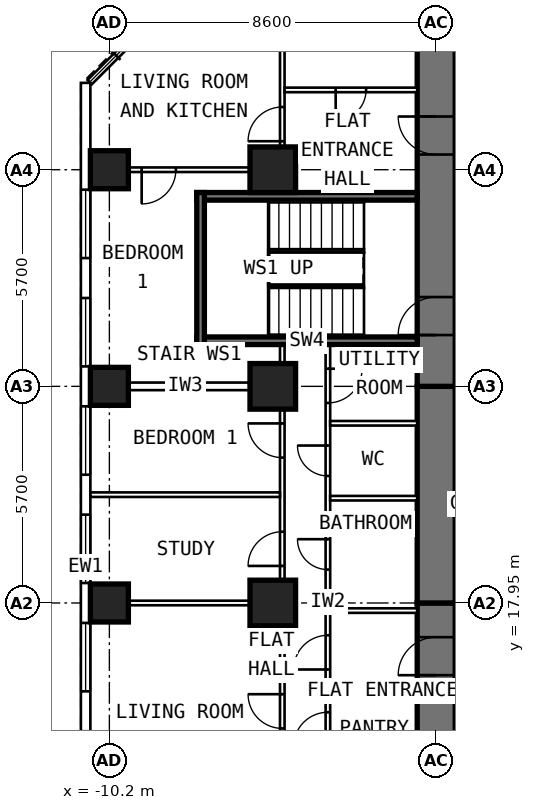
"""IFC4 building model, lengths in metres.
Left out: names, types, materials, properties, quantities, classifications, styles, units other than length and angle.
Written with IfcOpenShell. Run it as: python <this file> out.ifc"""

import sys

from ifc_helpers import new_model, si_unit, direction, frame, frame_2d, origin, origin_2d, place, context, subcontext, project, spatial, rectangle, extrude, element, fill, save


model = new_model("IFC4")
c1 = context("Model", 3, precision=1e-05, world=origin(), true_north=direction((0.0, 1.0)))
c2 = subcontext(c1, "Body", "Model", "MODEL_VIEW")
j1 = project(units=[si_unit("LENGTHUNIT", "METRE"), si_unit("PLANEANGLEUNIT", "RADIAN")], contexts=[c1])
p1 = place(None, origin())
s1 = spatial("IfcSite", under=j1, at=p1, CompositionType="ELEMENT")
p2 = place(p1, origin())
s2 = spatial("IfcBuilding", under=s1, at=p2, CompositionType="ELEMENT")
p3 = place(p2, frame((0.0, 0.0, 64.6)))
s3 = spatial("IfcBuildingStorey", under=s2, at=p3, CompositionType="ELEMENT", Elevation=64.6)
for number, where, z_axis, x_axis in (
    (1, (-10.2, 17.95, 0.0), (0.0, 0.0, 1.0), (0.0, 1.0, 0.0)),
    (2, (-10.2, 23.65, 0.0), (0.0, 0.0, 1.0), (0.0, 1.0, 0.0)),
    (3, (-10.2, 29.35, 0.0), (0.0, 0.0, 1.0), (0.0, 1.0, 0.0)),
):
    element("IfcColumn", number, at=place(p3, frame(where, z_axis=z_axis, x_axis=x_axis)), inside=s3, PredefinedType="COLUMN", context=c2, shape_type="SweptSolid", body=[
        extrude(rectangle(XDim=1.0, YDim=1.0, at=origin_2d()), origin(), (0.0, 0.0, 1.0), 3.6),
    ])
for number, where, z_axis, x_axis in (
    (4, (-5.9, 17.95, 0.0), (0.0, 0.0, 1.0), (0.0, 1.0, 0.0)),
    (5, (-5.9, 23.65, 0.0), (0.0, 0.0, 1.0), (0.0, 1.0, 0.0)),
    (6, (-5.9, 29.35, 0.0), (0.0, 0.0, 1.0), (0.0, 1.0, 0.0)),
):
    element("IfcColumn", number, at=place(p3, frame(where, z_axis=z_axis, x_axis=x_axis)), inside=s3, PredefinedType="COLUMN", context=c2, shape_type="SweptSolid", body=[
        extrude(rectangle(XDim=1.2, YDim=1.2, at=origin_2d()), origin(), (0.0, 0.0, 1.0), 3.6),
    ])
p4 = place(p3, frame((-1.6, 9.6, 0.0), z_axis=(0.0, 0.0, 1.0), x_axis=(0.0, 1.0, 0.0)))
e7 = element("IfcWall", 7, at=p4, inside=s3, PredefinedType="SHEAR", context=c2, shape_type="SweptSolid", body=[
    extrude(rectangle(XDim=8.35, YDim=1.0, at=frame_2d((4.175, 0.0))), origin(), (0.0, 0.0, 1.0), 3.6),
])
p5 = place(p4, frame((6.45, 0.0, 0.0)))
e8 = element("IfcOpeningElement", 8, at=p5, cuts=e7, PredefinedType="OPENING", context=c2, shape_type="SweptSolid", body=[
    extrude(rectangle(XDim=1.0, YDim=2.1, at=frame_2d((0.5, 1.05))), frame((0.0, 0.512, 0.0), z_axis=(0.0, -1.0, 0.0), x_axis=(1.0, 0.0, 0.0)), (0.0, 0.0, 1.0), 1.024),
])
p6 = place(p3, frame((-1.6, 17.95, 0.0), z_axis=(0.0, 0.0, 1.0), x_axis=(0.0, 1.0, 0.0)))
e9 = element("IfcWall", 9, at=p6, inside=s3, PredefinedType="SHEAR", context=c2, shape_type="SweptSolid", body=[
    extrude(rectangle(XDim=5.7, YDim=1.0, at=frame_2d((2.85, 0.0))), origin(), (0.0, 0.0, 1.0), 3.6),
])
p7 = place(p3, frame((-1.6, 23.65, 0.0), z_axis=(0.0, 0.0, 1.0), x_axis=(0.0, 1.0, 0.0)))
e10 = element("IfcWall", 10, at=p7, inside=s3, PredefinedType="SHEAR", context=c2, shape_type="SweptSolid", body=[
    extrude(rectangle(XDim=10.745, YDim=1.0, at=frame_2d((5.373, 0.0))), origin(), (0.0, 0.0, 1.0), 3.6),
])
p8 = place(p7, frame((6.1, 0.0, 0.0)))
e11 = element("IfcOpeningElement", 11, at=p8, cuts=e10, PredefinedType="OPENING", context=c2, shape_type="SweptSolid", body=[
    extrude(rectangle(XDim=1.0, YDim=2.1, at=frame_2d((0.5, 1.05))), frame((0.0, 0.512, 0.0), z_axis=(0.0, -1.0, 0.0), x_axis=(1.0, 0.0, 0.0)), (0.0, 0.0, 1.0), 1.024),
])
p9 = place(p7, frame((1.35, 0.0, 0.0)))
e12 = element("IfcOpeningElement", 12, at=p9, cuts=e10, PredefinedType="OPENING", context=c2, shape_type="SweptSolid", body=[
    extrude(rectangle(XDim=1.0, YDim=2.1, at=frame_2d((0.5, 1.05))), frame((0.0, 0.512, 0.0), z_axis=(0.0, -1.0, 0.0), x_axis=(1.0, 0.0, 0.0)), (0.0, 0.0, 1.0), 1.024),
])
p10 = place(p3, frame((-10.825, 6.148, 0.0), z_axis=(0.0, 0.0, 1.0), x_axis=(0.0, 1.0, 0.0)))
e13 = element("IfcWall", 13, at=p10, inside=s3, PredefinedType="SOLIDWALL", context=c2, shape_type="SweptSolid", body=[
    extrude(rectangle(XDim=25.487, YDim=0.25, at=frame_2d((12.744, 0.0))), origin(), (0.0, 0.0, 1.0), 3.35),
])
p11 = place(p10, frame((0.927, 0.0, 0.8)))
e14 = element("IfcOpeningElement", 14, at=p11, cuts=e13, PredefinedType="OPENING", context=c2, shape_type="SweptSolid", body=[
    extrude(rectangle(XDim=1.8, YDim=1.8, at=frame_2d((0.9, 0.9))), frame((0.0, 0.137, 0.0), z_axis=(0.0, -1.0, 0.0), x_axis=(1.0, 0.0, 0.0)), (0.0, 0.0, 1.0), 0.274),
])
p12 = place(p10, frame((3.777, 0.0, 0.8)))
e15 = element("IfcOpeningElement", 15, at=p12, cuts=e13, PredefinedType="OPENING", context=c2, shape_type="SweptSolid", body=[
    extrude(rectangle(XDim=1.8, YDim=1.8, at=frame_2d((0.9, 0.9))), frame((0.0, 0.137, 0.0), z_axis=(0.0, -1.0, 0.0), x_axis=(1.0, 0.0, 0.0)), (0.0, 0.0, 1.0), 0.274),
])
p13 = place(p10, frame((6.627, 0.0, 0.8)))
e16 = element("IfcOpeningElement", 16, at=p13, cuts=e13, PredefinedType="OPENING", context=c2, shape_type="SweptSolid", body=[
    extrude(rectangle(XDim=1.8, YDim=1.8, at=frame_2d((0.9, 0.9))), frame((0.0, 0.137, 0.0), z_axis=(0.0, -1.0, 0.0), x_axis=(1.0, 0.0, 0.0)), (0.0, 0.0, 1.0), 0.274),
])
p14 = place(p10, frame((9.477, 0.0, 0.8)))
e17 = element("IfcOpeningElement", 17, at=p14, cuts=e13, PredefinedType="OPENING", context=c2, shape_type="SweptSolid", body=[
    extrude(rectangle(XDim=1.8, YDim=1.8, at=frame_2d((0.9, 0.9))), frame((0.0, 0.137, 0.0), z_axis=(0.0, -1.0, 0.0), x_axis=(1.0, 0.0, 0.0)), (0.0, 0.0, 1.0), 0.274),
])
p15 = place(p10, frame((12.327, 0.0, 0.8)))
e18 = element("IfcOpeningElement", 18, at=p15, cuts=e13, PredefinedType="OPENING", context=c2, shape_type="SweptSolid", body=[
    extrude(rectangle(XDim=1.8, YDim=1.8, at=frame_2d((0.9, 0.9))), frame((0.0, 0.137, 0.0), z_axis=(0.0, -1.0, 0.0), x_axis=(1.0, 0.0, 0.0)), (0.0, 0.0, 1.0), 0.274),
])
p16 = place(p10, frame((15.177, 0.0, 0.8)))
e19 = element("IfcOpeningElement", 19, at=p16, cuts=e13, PredefinedType="OPENING", context=c2, shape_type="SweptSolid", body=[
    extrude(rectangle(XDim=1.8, YDim=1.8, at=frame_2d((0.9, 0.9))), frame((0.0, 0.137, 0.0), z_axis=(0.0, -1.0, 0.0), x_axis=(1.0, 0.0, 0.0)), (0.0, 0.0, 1.0), 0.274),
])
p17 = place(p10, frame((18.027, 0.0, 0.8)))
e20 = element("IfcOpeningElement", 20, at=p17, cuts=e13, PredefinedType="OPENING", context=c2, shape_type="SweptSolid", body=[
    extrude(rectangle(XDim=1.8, YDim=1.8, at=frame_2d((0.9, 0.9))), frame((0.0, 0.137, 0.0), z_axis=(0.0, -1.0, 0.0), x_axis=(1.0, 0.0, 0.0)), (0.0, 0.0, 1.0), 0.274),
])
p18 = place(p10, frame((20.877, 0.0, 0.8)))
e21 = element("IfcOpeningElement", 21, at=p18, cuts=e13, PredefinedType="OPENING", context=c2, shape_type="SweptSolid", body=[
    extrude(rectangle(XDim=1.8, YDim=1.8, at=frame_2d((0.9, 0.9))), frame((0.0, 0.137, 0.0), z_axis=(0.0, -1.0, 0.0), x_axis=(1.0, 0.0, 0.0)), (0.0, 0.0, 1.0), 0.274),
])
p19 = place(p3, frame((-4.45, 10.1, 0.0), z_axis=(0.0, 0.0, 1.0), x_axis=(0.0, 1.0, 0.0)))
e22 = element("IfcWall", 22, at=p19, inside=s3, PredefinedType="PARTITIONING", context=c2, shape_type="SweptSolid", body=[
    extrude(rectangle(XDim=14.65, YDim=0.12, at=frame_2d((7.325, 0.0))), origin(), (0.0, 0.0, 1.0), 3.35),
])
p20 = place(p19, frame((0.375, 0.0, 0.0)))
e23 = element("IfcOpeningElement", 23, at=p20, cuts=e22, PredefinedType="OPENING", context=c2, shape_type="SweptSolid", body=[
    extrude(rectangle(XDim=0.9, YDim=2.1, at=frame_2d((0.45, 1.05))), frame((0.0, 0.072, 0.0), z_axis=(0.0, -1.0, 0.0), x_axis=(1.0, 0.0, 0.0)), (0.0, 0.0, 1.0), 0.144),
])
p21 = place(p19, frame((2.275, 0.0, 0.0)))
e24 = element("IfcOpeningElement", 24, at=p21, cuts=e22, PredefinedType="OPENING", context=c2, shape_type="SweptSolid", body=[
    extrude(rectangle(XDim=0.8, YDim=2.1, at=frame_2d((0.4, 1.05))), frame((0.0, 0.072, 0.0), z_axis=(0.0, -1.0, 0.0), x_axis=(1.0, 0.0, 0.0)), (0.0, 0.0, 1.0), 0.144),
])
p22 = place(p19, frame((4.075, 0.0, 0.0)))
e25 = element("IfcOpeningElement", 25, at=p22, cuts=e22, PredefinedType="OPENING", context=c2, shape_type="SweptSolid", body=[
    extrude(rectangle(XDim=0.9, YDim=2.1, at=frame_2d((0.45, 1.05))), frame((0.0, 0.072, 0.0), z_axis=(0.0, -1.0, 0.0), x_axis=(1.0, 0.0, 0.0)), (0.0, 0.0, 1.0), 0.144),
])
p23 = place(p19, frame((6.1, 0.0, 0.0)))
e26 = element("IfcOpeningElement", 26, at=p23, cuts=e22, PredefinedType="OPENING", context=c2, shape_type="SweptSolid", body=[
    extrude(rectangle(XDim=0.9, YDim=2.1, at=frame_2d((0.45, 1.05))), frame((0.0, 0.072, 0.0), z_axis=(0.0, -1.0, 0.0), x_axis=(1.0, 0.0, 0.0)), (0.0, 0.0, 1.0), 0.144),
])
p24 = place(p19, frame((8.729, 0.0, 0.0)))
e27 = element("IfcOpeningElement", 27, at=p24, cuts=e22, PredefinedType="OPENING", context=c2, shape_type="SweptSolid", body=[
    extrude(rectangle(XDim=0.8, YDim=2.1, at=frame_2d((0.4, 1.05))), frame((0.0, 0.072, 0.0), z_axis=(0.0, -1.0, 0.0), x_axis=(1.0, 0.0, 0.0)), (0.0, 0.0, 1.0), 0.144),
])
p25 = place(p19, frame((11.193, 0.0, 0.0)))
e28 = element("IfcOpeningElement", 28, at=p25, cuts=e22, PredefinedType="OPENING", context=c2, shape_type="SweptSolid", body=[
    extrude(rectangle(XDim=0.8, YDim=2.1, at=frame_2d((0.4, 1.05))), frame((0.0, 0.072, 0.0), z_axis=(0.0, -1.0, 0.0), x_axis=(1.0, 0.0, 0.0)), (0.0, 0.0, 1.0), 0.144),
])
p26 = place(p19, frame((13.114, 0.0, 0.0)))
e29 = element("IfcOpeningElement", 29, at=p26, cuts=e22, PredefinedType="OPENING", context=c2, shape_type="SweptSolid", body=[
    extrude(rectangle(XDim=0.9, YDim=2.1, at=frame_2d((0.45, 1.05))), frame((0.0, 0.072, 0.0), z_axis=(0.0, -1.0, 0.0), x_axis=(1.0, 0.0, 0.0)), (0.0, 0.0, 1.0), 0.144),
])
p27 = place(p3, frame((-5.65, 9.6, 0.0), z_axis=(0.0, 0.0, 1.0), x_axis=(0.0, 1.0, 0.0)))
e30 = element("IfcWall", 30, at=p27, inside=s3, PredefinedType="PARTITIONING", context=c2, shape_type="SweptSolid", body=[
    extrude(rectangle(XDim=15.15, YDim=0.12, at=frame_2d((7.575, 0.0))), origin(), (0.0, 0.0, 1.0), 3.35),
])
p28 = place(p27, frame((5.05, 0.0, 0.0)))
e31 = element("IfcOpeningElement", 31, at=p28, cuts=e30, PredefinedType="OPENING", context=c2, shape_type="SweptSolid", body=[
    extrude(rectangle(XDim=0.9, YDim=2.1, at=frame_2d((0.45, 1.05))), frame((0.0, 0.072, 0.0), z_axis=(0.0, -1.0, 0.0), x_axis=(1.0, 0.0, 0.0)), (0.0, 0.0, 1.0), 0.144),
])
p29 = place(p27, frame((9.325, 0.0, 0.0)))
e32 = element("IfcOpeningElement", 32, at=p29, cuts=e30, PredefinedType="OPENING", context=c2, shape_type="SweptSolid", body=[
    extrude(rectangle(XDim=0.9, YDim=2.1, at=frame_2d((0.45, 1.05))), frame((0.0, 0.072, 0.0), z_axis=(0.0, -1.0, 0.0), x_axis=(1.0, 0.0, 0.0)), (0.0, 0.0, 1.0), 0.144),
])
p30 = place(p27, frame((12.175, 0.0, 0.0)))
e33 = element("IfcOpeningElement", 33, at=p30, cuts=e30, PredefinedType="OPENING", context=c2, shape_type="SweptSolid", body=[
    extrude(rectangle(XDim=0.9, YDim=2.1, at=frame_2d((0.45, 1.05))), frame((0.0, 0.072, 0.0), z_axis=(0.0, -1.0, 0.0), x_axis=(1.0, 0.0, 0.0)), (0.0, 0.0, 1.0), 0.144),
])
p31 = place(p3, frame((-5.71, 17.95, 0.0), z_axis=(0.0, 0.0, 1.0), x_axis=(-1.0, 0.0, 0.0)))
e34 = element("IfcWall", 34, at=p31, inside=s3, PredefinedType="PARTITIONING", context=c2, shape_type="SweptSolid", body=[
    extrude(rectangle(XDim=4.99, YDim=0.12, at=frame_2d((2.495, 0.0))), origin(), (0.0, 0.0, 1.0), 2.45),
])
p32 = place(p3, frame((-5.71, 20.8, 0.0), z_axis=(0.0, 0.0, 1.0), x_axis=(-1.0, 0.0, 0.0)))
e35 = element("IfcWall", 35, at=p32, inside=s3, PredefinedType="PARTITIONING", context=c2, shape_type="SweptSolid", body=[
    extrude(rectangle(XDim=4.99, YDim=0.12, at=frame_2d((2.495, 0.0))), origin(), (0.0, 0.0, 1.0), 3.35),
])
p33 = place(p3, frame((-2.1, 15.55, 0.0), z_axis=(0.0, 0.0, 1.0), x_axis=(-1.0, 0.0, 0.0)))
e36 = element("IfcWall", 36, at=p33, inside=s3, PredefinedType="PARTITIONING", context=c2, shape_type="SweptSolid", body=[
    extrude(rectangle(XDim=2.29, YDim=0.12, at=frame_2d((1.145, 0.0))), origin(), (0.0, 0.0, 1.0), 3.35),
])
p34 = place(p3, frame((-2.1, 17.75, 0.0), z_axis=(0.0, 0.0, 1.0), x_axis=(-1.0, 0.0, 0.0)))
e37 = element("IfcWall", 37, at=p34, inside=s3, PredefinedType="PARTITIONING", context=c2, shape_type="SweptSolid", body=[
    extrude(rectangle(XDim=2.29, YDim=0.12, at=frame_2d((1.145, 0.0))), origin(), (0.0, 0.0, 1.0), 2.45),
])
for number, where, z_axis, x_axis in (
    (38, (-2.1, 20.707, 0.0), (0.0, 0.0, 1.0), (-1.0, 0.0, 0.0)),
    (39, (-2.1, 22.678, 0.0), (0.0, 0.0, 1.0), (-1.0, 0.0, 0.0)),
):
    element("IfcWall", number, at=place(p3, frame(where, z_axis=z_axis, x_axis=x_axis)), inside=s3, PredefinedType="PARTITIONING", context=c2, shape_type="SweptSolid", body=[
        extrude(rectangle(XDim=2.29, YDim=0.12, at=frame_2d((1.145, 0.0))), origin(), (0.0, 0.0, 1.0), 3.35),
    ])
p35 = place(p3, frame((-5.71, 23.65, 0.0), z_axis=(0.0, 0.0, 1.0), x_axis=(-1.0, 0.0, 0.0)))
e40 = element("IfcWall", 40, at=p35, inside=s3, PredefinedType="PARTITIONING", context=c2, shape_type="SweptSolid", body=[
    extrude(rectangle(XDim=4.99, YDim=0.2, at=frame_2d((2.495, 0.0))), origin(), (0.0, 0.0, 1.0), 2.45),
])
p36 = place(p3, frame((-5.71, 29.35, 0.0), z_axis=(0.0, 0.0, 1.0), x_axis=(-1.0, 0.0, 0.0)))
e41 = element("IfcWall", 41, at=p36, inside=s3, PredefinedType="PARTITIONING", context=c2, shape_type="SweptSolid", body=[
    extrude(rectangle(XDim=4.99, YDim=0.12, at=frame_2d((2.495, 0.0))), origin(), (0.0, 0.0, 1.0), 2.45),
])
p37 = place(p36, frame((2.74, 0.0, 0.0)))
e42 = element("IfcOpeningElement", 42, at=p37, cuts=e41, PredefinedType="OPENING", context=c2, shape_type="SweptSolid", body=[
    extrude(rectangle(XDim=0.9, YDim=2.1, at=frame_2d((0.45, 1.05))), frame((0.0, 0.072, 0.0), z_axis=(0.0, -1.0, 0.0), x_axis=(1.0, 0.0, 0.0)), (0.0, 0.0, 1.0), 0.144),
])
p38 = place(p3, frame((-5.65, 28.95, 0.0), z_axis=(0.0, 0.0, 1.0), x_axis=(0.0, 1.0, 0.0)))
e43 = element("IfcWall", 43, at=p38, inside=s3, PredefinedType="PARTITIONING", context=c2, shape_type="SweptSolid", body=[
    extrude(rectangle(XDim=5.445, YDim=0.12, at=frame_2d((2.723, 0.0))), origin(), (0.0, 0.0, 1.0), 3.35),
])
p39 = place(p38, frame((1.15, 0.0, 0.0)))
e44 = element("IfcOpeningElement", 44, at=p39, cuts=e43, PredefinedType="OPENING", context=c2, shape_type="SweptSolid", body=[
    extrude(rectangle(XDim=0.9, YDim=2.1, at=frame_2d((0.45, 1.05))), frame((0.0, 0.072, 0.0), z_axis=(0.0, -1.0, 0.0), x_axis=(1.0, 0.0, 0.0)), (0.0, 0.0, 1.0), 0.144),
])
p40 = place(p3, frame((-2.1, 31.45, 0.0), z_axis=(0.0, 0.0, 1.0), x_axis=(-1.0, 0.0, 0.0)))
e45 = element("IfcWall", 45, at=p40, inside=s3, PredefinedType="PARTITIONING", context=c2, shape_type="SweptSolid", body=[
    extrude(rectangle(XDim=3.49, YDim=0.12, at=frame_2d((1.745, 0.0))), origin(), (0.0, 0.0, 1.0), 3.35),
])
p41 = place(p40, frame((1.345, 0.0, 0.0)))
e46 = element("IfcOpeningElement", 46, at=p41, cuts=e45, PredefinedType="OPENING", context=c2, shape_type="SweptSolid", body=[
    extrude(rectangle(XDim=0.8, YDim=2.1, at=frame_2d((0.4, 1.05))), frame((0.0, 0.072, 0.0), z_axis=(0.0, -1.0, 0.0), x_axis=(1.0, 0.0, 0.0)), (0.0, 0.0, 1.0), 0.144),
])
for number, where, z_axis, x_axis in (
    (47, (-2.1, 24.85, 0.0), (0.0, 0.0, 1.0), (-1.0, 0.0, 0.0)),
    (48, (-2.1, 28.65, 0.0), (0.0, 0.0, 1.0), (-1.0, 0.0, 0.0)),
):
    element("IfcWall", number, at=place(p3, frame(where, z_axis=z_axis, x_axis=x_axis)), inside=s3, PredefinedType="SHEAR", context=c2, shape_type="SweptSolid", body=[
        extrude(rectangle(XDim=5.8, YDim=0.2, at=frame_2d((2.9, 0.0))), origin(), (0.0, 0.0, 1.0), 3.33),
    ])
p42 = place(p3, frame((-7.8, 24.75, 0.0), z_axis=(0.0, 0.0, 1.0), x_axis=(0.0, 1.0, 0.0)))
e49 = element("IfcWall", 49, at=p42, inside=s3, PredefinedType="SHEAR", context=c2, shape_type="SweptSolid", body=[
    extrude(rectangle(XDim=4.0, YDim=0.2, at=frame_2d((2.0, 0.0))), origin(), (0.0, 0.0, 1.0), 3.33),
])
p43 = place(p14, origin())
e50 = element("IfcWindow", 50, at=p43, inside=s3, PartitioningType="SINGLE_PANEL", PredefinedType="WINDOW", context=c2, shape_type="SweptSolid", body=[
    extrude(rectangle(XDim=1.8, YDim=1.8, at=frame_2d((0.9, 0.9))), frame((0.0, 0.03, 0.0), z_axis=(0.0, -1.0, 0.0), x_axis=(1.0, 0.0, 0.0)), (0.0, 0.0, 1.0), 0.06),
])
fill(e17, e50)
p44 = place(p15, origin())
e51 = element("IfcWindow", 51, at=p44, inside=s3, PartitioningType="SINGLE_PANEL", PredefinedType="WINDOW", context=c2, shape_type="SweptSolid", body=[
    extrude(rectangle(XDim=1.8, YDim=1.8, at=frame_2d((0.9, 0.9))), frame((0.0, 0.03, 0.0), z_axis=(0.0, -1.0, 0.0), x_axis=(1.0, 0.0, 0.0)), (0.0, 0.0, 1.0), 0.06),
])
fill(e18, e51)
p45 = place(p16, origin())
e52 = element("IfcWindow", 52, at=p45, inside=s3, PartitioningType="SINGLE_PANEL", PredefinedType="WINDOW", context=c2, shape_type="SweptSolid", body=[
    extrude(rectangle(XDim=1.8, YDim=1.8, at=frame_2d((0.9, 0.9))), frame((0.0, 0.03, 0.0), z_axis=(0.0, -1.0, 0.0), x_axis=(1.0, 0.0, 0.0)), (0.0, 0.0, 1.0), 0.06),
])
fill(e19, e52)
p46 = place(p17, origin())
e53 = element("IfcWindow", 53, at=p46, inside=s3, PartitioningType="SINGLE_PANEL", PredefinedType="WINDOW", context=c2, shape_type="SweptSolid", body=[
    extrude(rectangle(XDim=1.8, YDim=1.8, at=frame_2d((0.9, 0.9))), frame((0.0, 0.03, 0.0), z_axis=(0.0, -1.0, 0.0), x_axis=(1.0, 0.0, 0.0)), (0.0, 0.0, 1.0), 0.06),
])
fill(e20, e53)
p47 = place(p18, origin())
e54 = element("IfcWindow", 54, at=p47, inside=s3, PartitioningType="SINGLE_PANEL", PredefinedType="WINDOW", context=c2, shape_type="SweptSolid", body=[
    extrude(rectangle(XDim=1.8, YDim=1.8, at=frame_2d((0.9, 0.9))), frame((0.0, 0.03, 0.0), z_axis=(0.0, -1.0, 0.0), x_axis=(1.0, 0.0, 0.0)), (0.0, 0.0, 1.0), 0.06),
])
fill(e21, e54)
p48 = place(p5, origin())
e55 = element("IfcDoor", 55, at=p48, inside=s3, OperationType="SINGLE_SWING_LEFT", PredefinedType="DOOR", context=c2, shape_type="SweptSolid", body=[
    extrude(rectangle(XDim=1.0, YDim=2.1, at=frame_2d((0.5, 1.05))), frame((0.0, 0.25, 0.0), z_axis=(0.0, -1.0, 0.0), x_axis=(1.0, 0.0, 0.0)), (0.0, 0.0, 1.0), 0.5),
])
fill(e8, e55)
p49 = place(p28, origin())
e56 = element("IfcDoor", 56, at=p49, inside=s3, OperationType="SINGLE_SWING_RIGHT", PredefinedType="DOOR", context=c2, shape_type="SweptSolid", body=[
    extrude(rectangle(XDim=0.9, YDim=2.1, at=frame_2d((0.45, 1.05))), frame((0.0, 0.025, 0.0), z_axis=(0.0, -1.0, 0.0), x_axis=(1.0, 0.0, 0.0)), (0.0, 0.0, 1.0), 0.05),
])
fill(e31, e56)
p50 = place(p29, origin())
e57 = element("IfcDoor", 57, at=p50, inside=s3, OperationType="SINGLE_SWING_LEFT", PredefinedType="DOOR", context=c2, shape_type="SweptSolid", body=[
    extrude(rectangle(XDim=0.9, YDim=2.1, at=frame_2d((0.45, 1.05))), frame((0.0, 0.025, 0.0), z_axis=(0.0, -1.0, 0.0), x_axis=(1.0, 0.0, 0.0)), (0.0, 0.0, 1.0), 0.05),
])
fill(e32, e57)
p51 = place(p30, origin())
e58 = element("IfcDoor", 58, at=p51, inside=s3, OperationType="SINGLE_SWING_RIGHT", PredefinedType="DOOR", context=c2, shape_type="SweptSolid", body=[
    extrude(rectangle(XDim=0.9, YDim=2.1, at=frame_2d((0.45, 1.05))), frame((0.0, 0.025, 0.0), z_axis=(0.0, -1.0, 0.0), x_axis=(1.0, 0.0, 0.0)), (0.0, 0.0, 1.0), 0.05),
])
fill(e33, e58)
p52 = place(p22, origin())
e59 = element("IfcDoor", 59, at=p52, inside=s3, OperationType="SINGLE_SWING_LEFT", PredefinedType="DOOR", context=c2, shape_type="SweptSolid", body=[
    extrude(rectangle(XDim=0.9, YDim=2.1, at=frame_2d((0.45, 1.05))), frame((0.0, 0.025, 0.0), z_axis=(0.0, -1.0, 0.0), x_axis=(1.0, 0.0, 0.0)), (0.0, 0.0, 1.0), 0.05),
])
fill(e25, e59)
p53 = place(p23, origin())
e60 = element("IfcDoor", 60, at=p53, inside=s3, OperationType="SINGLE_SWING_LEFT", PredefinedType="DOOR", context=c2, shape_type="SweptSolid", body=[
    extrude(rectangle(XDim=0.9, YDim=2.1, at=frame_2d((0.45, 1.05))), frame((0.0, 0.025, 0.0), z_axis=(0.0, -1.0, 0.0), x_axis=(1.0, 0.0, 0.0)), (0.0, 0.0, 1.0), 0.05),
])
fill(e26, e60)
p54 = place(p24, origin())
e61 = element("IfcDoor", 61, at=p54, inside=s3, OperationType="SINGLE_SWING_RIGHT", PredefinedType="DOOR", context=c2, shape_type="SweptSolid", body=[
    extrude(rectangle(XDim=0.8, YDim=2.1, at=frame_2d((0.4, 1.05))), frame((0.0, 0.025, 0.0), z_axis=(0.0, -1.0, 0.0), x_axis=(1.0, 0.0, 0.0)), (0.0, 0.0, 1.0), 0.05),
])
fill(e27, e61)
p55 = place(p25, origin())
e62 = element("IfcDoor", 62, at=p55, inside=s3, OperationType="SINGLE_SWING_RIGHT", PredefinedType="DOOR", context=c2, shape_type="SweptSolid", body=[
    extrude(rectangle(XDim=0.8, YDim=2.1, at=frame_2d((0.4, 1.05))), frame((0.0, 0.025, 0.0), z_axis=(0.0, -1.0, 0.0), x_axis=(1.0, 0.0, 0.0)), (0.0, 0.0, 1.0), 0.05),
])
fill(e28, e62)
p56 = place(p26, frame((0.9, 0.0, 0.0), z_axis=(0.0, 0.0, 1.0), x_axis=(-1.0, 0.0, 0.0)))
e63 = element("IfcDoor", 63, at=p56, inside=s3, OperationType="SINGLE_SWING_LEFT", PredefinedType="DOOR", context=c2, shape_type="SweptSolid", body=[
    extrude(rectangle(XDim=0.9, YDim=2.1, at=frame_2d((0.45, 1.05))), frame((0.0, 0.025, 0.0), z_axis=(0.0, -1.0, 0.0), x_axis=(1.0, 0.0, 0.0)), (0.0, 0.0, 1.0), 0.05),
])
fill(e29, e63)
p57 = place(p37, origin())
e64 = element("IfcDoor", 64, at=p57, inside=s3, OperationType="SINGLE_SWING_RIGHT", PredefinedType="DOOR", context=c2, shape_type="SweptSolid", body=[
    extrude(rectangle(XDim=0.9, YDim=2.1, at=frame_2d((0.45, 1.05))), frame((0.0, 0.025, 0.0), z_axis=(0.0, -1.0, 0.0), x_axis=(1.0, 0.0, 0.0)), (0.0, 0.0, 1.0), 0.05),
])
fill(e42, e64)
p58 = place(p39, origin())
e65 = element("IfcDoor", 65, at=p58, inside=s3, OperationType="SINGLE_SWING_LEFT", PredefinedType="DOOR", context=c2, shape_type="SweptSolid", body=[
    extrude(rectangle(XDim=0.9, YDim=2.1, at=frame_2d((0.45, 1.05))), frame((0.0, 0.025, 0.0), z_axis=(0.0, -1.0, 0.0), x_axis=(1.0, 0.0, 0.0)), (0.0, 0.0, 1.0), 0.05),
])
fill(e44, e65)
p59 = place(p41, origin())
e66 = element("IfcDoor", 66, at=p59, inside=s3, OperationType="SINGLE_SWING_RIGHT", PredefinedType="DOOR", context=c2, shape_type="SweptSolid", body=[
    extrude(rectangle(XDim=0.8, YDim=2.1, at=frame_2d((0.4, 1.05))), frame((0.0, 0.025, 0.0), z_axis=(0.0, -1.0, 0.0), x_axis=(1.0, 0.0, 0.0)), (0.0, 0.0, 1.0), 0.05),
])
fill(e46, e66)
p60 = place(p8, origin())
e67 = element("IfcDoor", 67, at=p60, inside=s3, OperationType="SINGLE_SWING_RIGHT", PredefinedType="DOOR", context=c2, shape_type="SweptSolid", body=[
    extrude(rectangle(XDim=1.0, YDim=2.1, at=frame_2d((0.5, 1.05))), frame((0.0, 0.25, 0.0), z_axis=(0.0, -1.0, 0.0), x_axis=(1.0, 0.0, 0.0)), (0.0, 0.0, 1.0), 0.5),
])
fill(e11, e67)
p61 = place(p9, origin())
e68 = element("IfcDoor", 68, at=p61, inside=s3, OperationType="SINGLE_SWING_LEFT", PredefinedType="DOOR", context=c2, shape_type="SweptSolid", body=[
    extrude(rectangle(XDim=1.0, YDim=2.1, at=frame_2d((0.5, 1.05))), frame((0.0, 0.25, 0.0), z_axis=(0.0, -1.0, 0.0), x_axis=(1.0, 0.0, 0.0)), (0.0, 0.0, 1.0), 0.5),
])
fill(e12, e68)
save(model, sys.argv[1])
